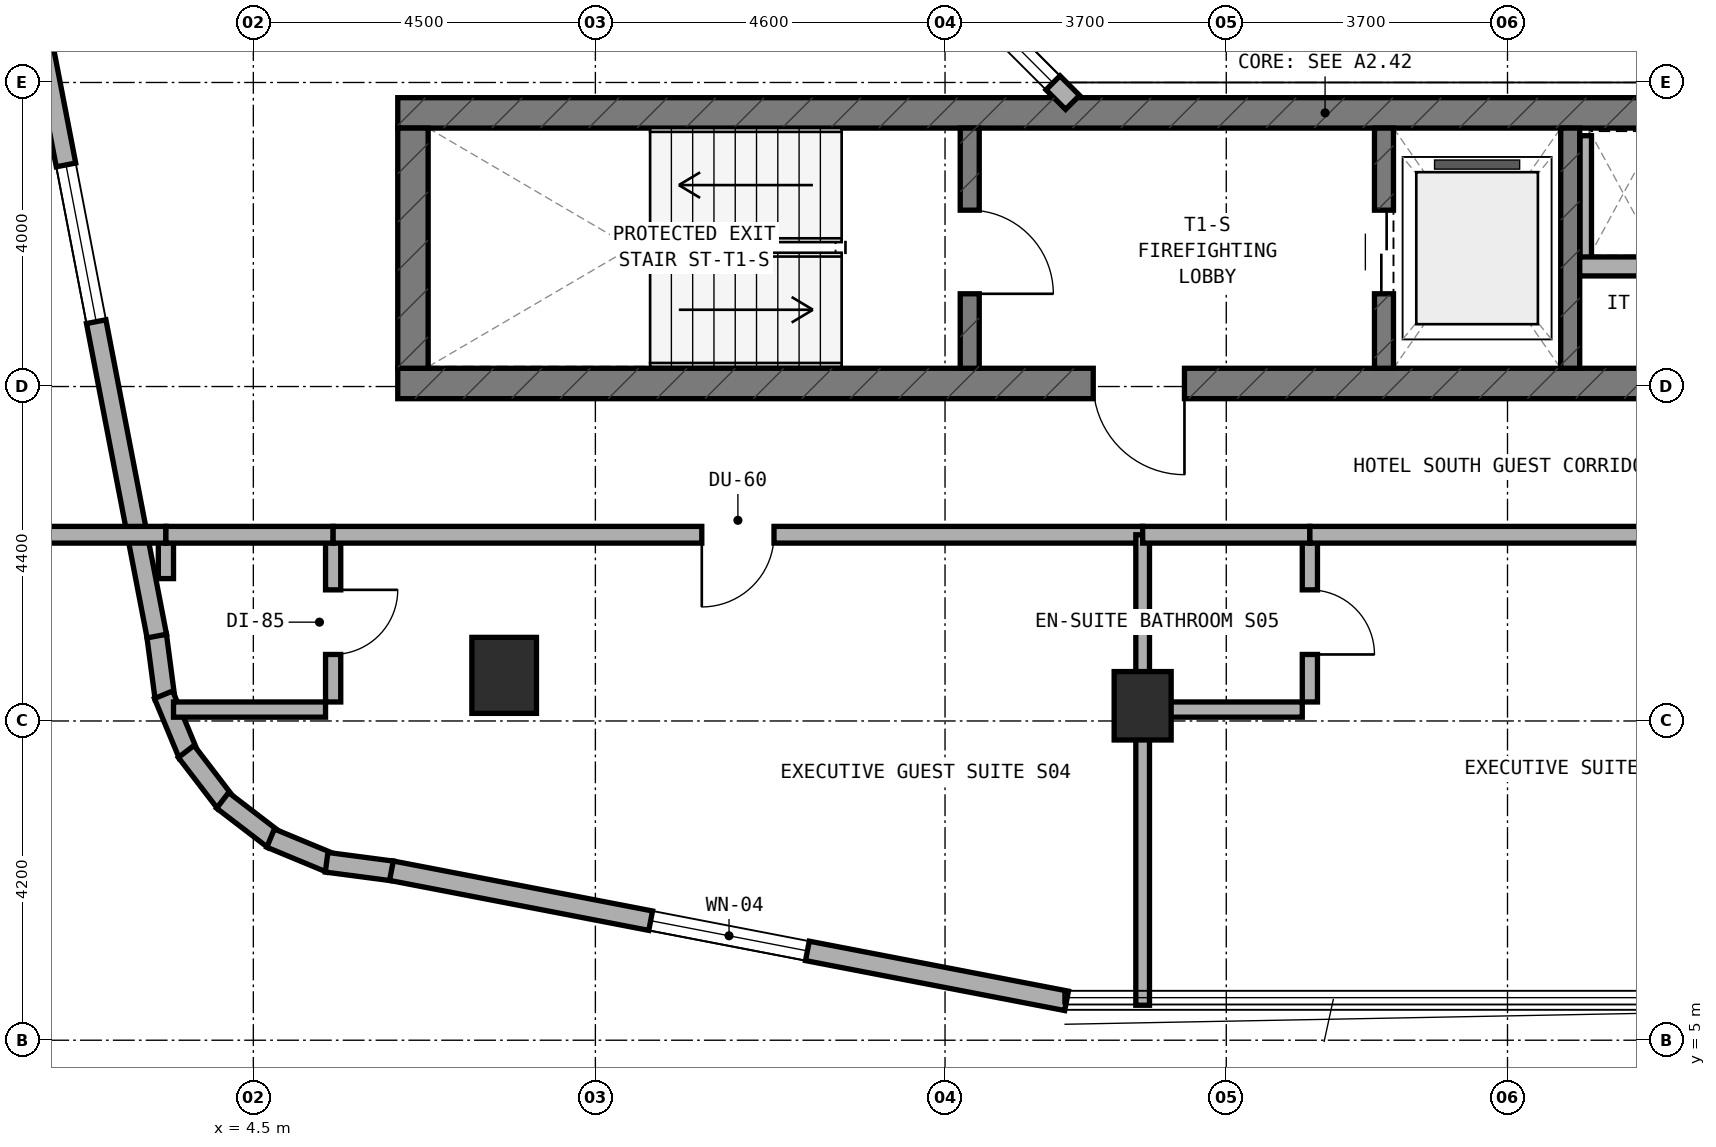
"""IFC4 building model, lengths in metres.
Left out: names, types, materials, properties, quantities, classifications, styles, units other than length and angle.
Written with IfcOpenShell. Run it as: python <this file> out.ifc"""

import sys

from ifc_helpers import new_model, si_unit, direction, frame, frame_2d, origin, origin_2d, place, context, subcontext, project, spatial, rectangle, extrude, element, fill, save


model = new_model("IFC4")
c1 = context("Model", 3, precision=1e-05, world=origin(), true_north=direction((0.0, 1.0)))
c2 = subcontext(c1, "Body", "Model", "MODEL_VIEW")
j1 = project(units=[si_unit("LENGTHUNIT", "METRE"), si_unit("PLANEANGLEUNIT", "RADIAN")], contexts=[c1])
p1 = place(None, origin())
s1 = spatial("IfcSite", under=j1, at=p1, CompositionType="ELEMENT")
p2 = place(p1, origin())
s2 = spatial("IfcBuilding", under=s1, at=p2, CompositionType="ELEMENT")
p3 = place(p2, frame((0.0, 0.0, 191.9)))
s3 = spatial("IfcBuildingStorey", under=s2, at=p3, CompositionType="ELEMENT", Elevation=191.9)
p4 = place(p3, frame((6.4, 13.64, 0.0), z_axis=(0.0, 0.0, 1.0), x_axis=(1.0, 0.0, 0.0)))
e1 = element("IfcWall", 1, at=p4, inside=s3, PredefinedType="SHEAR", context=c2, shape_type="SweptSolid", body=[
    extrude(rectangle(XDim=24.4, YDim=0.4, at=frame_2d((12.2, 0.0))), origin(), (0.0, 0.0, 1.0), 3.6),
])
p5 = place(p4, frame((9.15, 0.0, 0.0)))
e2 = element("IfcOpeningElement", 2, at=p5, cuts=e1, PredefinedType="OPENING", context=c2, shape_type="SweptSolid", body=[
    extrude(rectangle(XDim=1.2, YDim=2.15, at=frame_2d((0.6, 1.075))), frame((0.0, 0.21, 0.0), z_axis=(0.0, -1.0, 0.0), x_axis=(1.0, 0.0, 0.0)), (0.0, 0.0, 1.0), 0.42),
])
p6 = place(p4, frame((16.94, 0.0, 0.0)))
e3 = element("IfcOpeningElement", 3, at=p6, cuts=e1, PredefinedType="OPENING", context=c2, shape_type="SweptSolid", body=[
    extrude(rectangle(XDim=0.85, YDim=2.1, at=frame_2d((0.425, 1.05))), frame((0.0, 0.21, 0.0), z_axis=(0.0, -1.0, 0.0), x_axis=(1.0, 0.0, 0.0)), (0.0, 0.0, 1.0), 0.42),
])
p7 = place(p4, frame((18.783, 0.0, 0.0)))
e4 = element("IfcOpeningElement", 4, at=p7, cuts=e1, PredefinedType="OPENING", context=c2, shape_type="SweptSolid", body=[
    extrude(rectangle(XDim=1.1, YDim=2.15, at=frame_2d((0.55, 1.075))), frame((0.0, 0.21, 0.0), z_axis=(0.0, -1.0, 0.0), x_axis=(1.0, 0.0, 0.0)), (0.0, 0.0, 1.0), 0.42),
])
p8 = place(p4, frame((20.65, 0.0, 0.0)))
e5 = element("IfcOpeningElement", 5, at=p8, cuts=e1, PredefinedType="OPENING", context=c2, shape_type="SweptSolid", body=[
    extrude(rectangle(XDim=1.1, YDim=2.15, at=frame_2d((0.55, 1.075))), frame((0.0, 0.21, 0.0), z_axis=(0.0, -1.0, 0.0), x_axis=(1.0, 0.0, 0.0)), (0.0, 0.0, 1.0), 0.42),
])
p9 = place(p4, frame((22.517, 0.0, 0.0)))
e6 = element("IfcOpeningElement", 6, at=p9, cuts=e1, PredefinedType="OPENING", context=c2, shape_type="SweptSolid", body=[
    extrude(rectangle(XDim=1.1, YDim=2.15, at=frame_2d((0.55, 1.075))), frame((0.0, 0.21, 0.0), z_axis=(0.0, -1.0, 0.0), x_axis=(1.0, 0.0, 0.0)), (0.0, 0.0, 1.0), 0.42),
])
p10 = place(p3, frame((6.4, 17.2, 0.0), z_axis=(0.0, 0.0, 1.0), x_axis=(1.0, 0.0, 0.0)))
e7 = element("IfcWall", 7, at=p10, inside=s3, PredefinedType="SHEAR", context=c2, shape_type="SweptSolid", body=[
    extrude(rectangle(XDim=24.4, YDim=0.4, at=frame_2d((12.2, 0.0))), origin(), (0.0, 0.0, 1.0), 3.6),
])
p11 = place(p3, frame((6.6, 13.84, 0.0), z_axis=(0.0, 0.0, 1.0), x_axis=(0.0, 1.0, 0.0)))
e8 = element("IfcWall", 8, at=p11, inside=s3, PredefinedType="SHEAR", context=c2, shape_type="SweptSolid", body=[
    extrude(rectangle(XDim=3.16, YDim=0.4, at=frame_2d((1.58, 0.0))), origin(), (0.0, 0.0, 1.0), 3.6),
])
p12 = place(p3, frame((13.925, 13.84, 0.0), z_axis=(0.0, 0.0, 1.0), x_axis=(0.0, 1.0, 0.0)))
e9 = element("IfcWall", 9, at=p12, inside=s3, PredefinedType="STANDARD", context=c2, shape_type="SweptSolid", body=[
    extrude(rectangle(XDim=3.16, YDim=0.25, at=frame_2d((1.58, 0.0))), origin(), (0.0, 0.0, 1.0), 3.32),
])
p13 = place(p12, frame((0.98, 0.0, 0.0)))
e10 = element("IfcOpeningElement", 10, at=p13, cuts=e9, PredefinedType="OPENING", context=c2, shape_type="SweptSolid", body=[
    extrude(rectangle(XDim=1.1, YDim=2.15, at=frame_2d((0.55, 1.075))), frame((0.0, 0.135, 0.0), z_axis=(0.0, -1.0, 0.0), x_axis=(1.0, 0.0, 0.0)), (0.0, 0.0, 1.0), 0.27),
])
p14 = place(p3, frame((19.375, 13.84, 0.0), z_axis=(0.0, 0.0, 1.0), x_axis=(0.0, 1.0, 0.0)))
e11 = element("IfcWall", 11, at=p14, inside=s3, PredefinedType="STANDARD", context=c2, shape_type="SweptSolid", body=[
    extrude(rectangle(XDim=3.16, YDim=0.25, at=frame_2d((1.58, 0.0))), origin(), (0.0, 0.0, 1.0), 3.32),
])
p15 = place(p14, frame((0.98, 0.0, 0.0)))
e12 = element("IfcOpeningElement", 12, at=p15, cuts=e11, PredefinedType="OPENING", context=c2, shape_type="SweptSolid", body=[
    extrude(rectangle(XDim=1.1, YDim=2.15, at=frame_2d((0.55, 1.075))), frame((0.0, 0.135, 0.0), z_axis=(0.0, -1.0, 0.0), x_axis=(1.0, 0.0, 0.0)), (0.0, 0.0, 1.0), 0.27),
])
p16 = place(p3, frame((21.825, 13.84, 0.0), z_axis=(0.0, 0.0, 1.0), x_axis=(0.0, 1.0, 0.0)))
e13 = element("IfcWall", 13, at=p16, inside=s3, PredefinedType="STANDARD", context=c2, shape_type="SweptSolid", body=[
    extrude(rectangle(XDim=3.16, YDim=0.25, at=frame_2d((1.58, 0.0))), origin(), (0.0, 0.0, 1.0), 3.32),
])
p17 = place(p3, frame((16.2, 9.4, 0.0), z_axis=(0.0, 0.0, 1.0), x_axis=(1.0, 0.0, 0.0)))
e14 = element("IfcColumn", 14, at=p17, inside=s3, PredefinedType="COLUMN", context=c2, shape_type="SweptSolid", body=[
    extrude(rectangle(XDim=0.75, YDim=0.9, at=origin_2d()), origin(), (0.0, 0.0, 1.0), 3.6),
])
p18 = place(p3, frame((7.8, 9.8, 0.0), z_axis=(0.0, 0.0, 1.0), x_axis=(1.0, 0.0, 0.0)))
e15 = element("IfcColumn", 15, at=p18, inside=s3, PredefinedType="COLUMN", context=c2, shape_type="SweptSolid", body=[
    extrude(rectangle(XDim=0.85, YDim=1.0, at=origin_2d()), origin(), (0.0, 0.0, 1.0), 3.6),
])
p19 = place(p3, frame((3.228, 10.325, 0.0), z_axis=(0.0, 0.0, 1.0), x_axis=(0.130704676564, -0.99142134712, 0.0)))
e16 = element("IfcWall", 16, at=p19, inside=s3, PredefinedType="STANDARD", context=c2, shape_type="SweptSolid", body=[
    extrude(rectangle(XDim=0.833, YDim=0.26, at=frame_2d((0.417, 0.0))), origin(), (0.0, 0.0, 1.0), 3.32),
])
p20 = place(p3, frame((3.319, 9.545, 0.0), z_axis=(0.0, 0.0, 1.0), x_axis=(0.383086687796, -0.923712395518, 0.0)))
e17 = element("IfcWall", 17, at=p20, inside=s3, PredefinedType="STANDARD", context=c2, shape_type="SweptSolid", body=[
    extrude(rectangle(XDim=0.851, YDim=0.26, at=frame_2d((0.425, 0.0))), origin(), (0.0, 0.0, 1.0), 3.32),
])
for number, where, z_axis, x_axis in (
    (18, (3.617, 8.799, 0.0), (0.0, 0.0, 1.0), (0.608, -0.794, 0.0)),
    (19, (4.096, 8.155, 0.0), (0.0, 0.0, 1.0), (0.794, -0.608, 0.0)),
):
    element("IfcWall", number, at=place(p3, frame(where, z_axis=z_axis, x_axis=x_axis)), inside=s3, PredefinedType="STANDARD", context=c2, shape_type="SweptSolid", body=[
        extrude(rectangle(XDim=0.85, YDim=0.26, at=frame_2d((0.425, 0.0))), origin(), (0.0, 0.0, 1.0), 3.32),
    ])
p21 = place(p3, frame((4.727, 7.659, 0.0), z_axis=(0.0, 0.0, 1.0), x_axis=(0.923712395518, -0.383086687796, 0.0)))
e20 = element("IfcWall", 20, at=p21, inside=s3, PredefinedType="STANDARD", context=c2, shape_type="SweptSolid", body=[
    extrude(rectangle(XDim=0.851, YDim=0.26, at=frame_2d((0.425, 0.0))), origin(), (0.0, 0.0, 1.0), 3.32),
])
p22 = place(p3, frame((5.464, 7.341, 0.0), z_axis=(0.0, 0.0, 1.0), x_axis=(0.991488716273, -0.130192647656, 0.0)))
e21 = element("IfcWall", 21, at=p22, inside=s3, PredefinedType="STANDARD", context=c2, shape_type="SweptSolid", body=[
    extrude(rectangle(XDim=0.868, YDim=0.26, at=frame_2d((0.434, 0.0))), origin(), (0.0, 0.0, 1.0), 3.32),
])
p23 = place(p3, frame((6.317, 7.23, 0.0), z_axis=(0.0, 0.0, 1.0), x_axis=(0.98192801022, -0.189254809039, 0.0)))
e22 = element("IfcWall", 22, at=p23, inside=s3, PredefinedType="STANDARD", context=c2, shape_type="SweptSolid", body=[
    extrude(rectangle(XDim=9.046, YDim=0.26, at=frame_2d((4.523, 0.0))), origin(), (0.0, 0.0, 1.0), 3.32),
])
p24 = place(p23, frame((3.473, 0.0, 0.85)))
e23 = element("IfcOpeningElement", 23, at=p24, cuts=e22, PredefinedType="OPENING", context=c2, shape_type="SweptSolid", body=[
    extrude(rectangle(XDim=2.1, YDim=1.5, at=frame_2d((1.05, 0.75))), frame((0.0, 0.14, 0.0), z_axis=(0.0, -1.0, 0.0), x_axis=(1.0, 0.0, 0.0)), (0.0, 0.0, 1.0), 0.28),
])
p25 = place(p3, frame((15.278, 17.338, 0.0), z_axis=(0.0, 0.0, 1.0), x_axis=(-0.707106781187, 0.707106781187, 0.0)))
e24 = element("IfcWall", 24, at=p25, inside=s3, PredefinedType="STANDARD", context=c2, shape_type="SweptSolid", body=[
    extrude(rectangle(XDim=2.529, YDim=0.26, at=frame_2d((1.264, 0.0))), origin(), (0.0, 0.0, 1.0), 3.32),
])
p26 = place(p25, frame((0.364, 0.0, 0.85)))
e25 = element("IfcOpeningElement", 25, at=p26, cuts=e24, PredefinedType="OPENING", context=c2, shape_type="SweptSolid", body=[
    extrude(rectangle(XDim=1.8, YDim=1.5, at=frame_2d((0.9, 0.75))), frame((0.0, 0.14, 0.0), z_axis=(0.0, -1.0, 0.0), x_axis=(1.0, 0.0, 0.0)), (0.0, 0.0, 1.0), 0.28),
])
p27 = place(p3, frame((1.518, 19.199, 0.0), z_axis=(0.0, 0.0, 1.0), x_axis=(0.189254809039, -0.98192801022, 0.0)))
e26 = element("IfcWall", 26, at=p27, inside=s3, PredefinedType="STANDARD", context=c2, shape_type="SweptSolid", body=[
    extrude(rectangle(XDim=9.046, YDim=0.26, at=frame_2d((4.523, 0.0))), origin(), (0.0, 0.0, 1.0), 3.32),
])
p28 = place(p27, frame((2.733, 0.0, 0.85)))
e27 = element("IfcOpeningElement", 27, at=p28, cuts=e26, PredefinedType="OPENING", context=c2, shape_type="SweptSolid", body=[
    extrude(rectangle(XDim=2.1, YDim=1.5, at=frame_2d((1.05, 0.75))), frame((0.0, 0.14, 0.0), z_axis=(0.0, -1.0, 0.0), x_axis=(1.0, 0.0, 0.0)), (0.0, 0.0, 1.0), 0.28),
])
p29 = place(p3, frame((22.03, 15.28, 0.0), z_axis=(0.0, 0.0, 1.0), x_axis=(0.0, 1.0, 0.0)))
e28 = element("IfcWall", 28, at=p29, inside=s3, PredefinedType="PARTITIONING", context=c2, shape_type="SweptSolid", body=[
    extrude(rectangle(XDim=1.62, YDim=0.15, at=frame_2d((0.81, 0.0))), origin(), (0.0, 0.0, 1.0), 3.32),
])
p30 = place(p3, frame((21.95, 15.18, 0.0), z_axis=(0.0, 0.0, 1.0), x_axis=(1.0, 0.0, 0.0)))
e29 = element("IfcWall", 29, at=p30, inside=s3, PredefinedType="SOLIDWALL", context=c2, shape_type="SweptSolid", body=[
    extrude(rectangle(XDim=1.15, YDim=0.25, at=frame_2d((0.575, 0.0))), origin(), (0.0, 0.0, 1.0), 3.32),
])
p31 = place(p3, frame((5.55, 9.45, 0.0), z_axis=(0.0, 0.0, 1.0), x_axis=(0.0, 1.0, 0.0)))
e30 = element("IfcWall", 30, at=p31, inside=s3, PredefinedType="PLUMBINGWALL", context=c2, shape_type="SweptSolid", body=[
    extrude(rectangle(XDim=2.1, YDim=0.2, at=frame_2d((1.05, 0.0))), origin(), (0.0, 0.0, 1.0), 3.32),
])
p32 = place(p31, frame((0.625, 0.0, 0.0)))
e31 = element("IfcOpeningElement", 31, at=p32, cuts=e30, PredefinedType="OPENING", context=c2, shape_type="SweptSolid", body=[
    extrude(rectangle(XDim=0.85, YDim=2.1, at=frame_2d((0.425, 1.05))), frame((0.0, 0.11, 0.0), z_axis=(0.0, -1.0, 0.0), x_axis=(1.0, 0.0, 0.0)), (0.0, 0.0, 1.0), 0.22),
])
p33 = place(p3, frame((3.45, 9.35, 0.0), z_axis=(0.0, 0.0, 1.0), x_axis=(1.0, 0.0, 0.0)))
e32 = element("IfcWall", 32, at=p33, inside=s3, PredefinedType="PLUMBINGWALL", context=c2, shape_type="SweptSolid", body=[
    extrude(rectangle(XDim=2.0, YDim=0.2, at=frame_2d((1.0, 0.0))), origin(), (0.0, 0.0, 1.0), 3.32),
])
p34 = place(p3, frame((3.35, 11.073, 0.0), z_axis=(0.0, 0.0, 1.0), x_axis=(0.0, 1.0, 0.0)))
e33 = element("IfcWall", 33, at=p34, inside=s3, PredefinedType="PLUMBINGWALL", context=c2, shape_type="SweptSolid", body=[
    extrude(rectangle(XDim=0.577, YDim=0.2, at=frame_2d((0.289, 0.0))), origin(), (0.0, 0.0, 1.0), 3.32),
])
p35 = place(p3, frame((1.56, 11.65, 0.0), z_axis=(0.0, 0.0, 1.0), x_axis=(1.0, 0.0, 0.0)))
e34 = element("IfcWall", 34, at=p35, inside=s3, PredefinedType="SOLIDWALL", context=c2, shape_type="SweptSolid", body=[
    extrude(rectangle(XDim=1.79, YDim=0.22, at=frame_2d((0.895, 0.0))), origin(), (0.0, 0.0, 1.0), 3.32),
])
p36 = place(p3, frame((3.35, 11.65, 0.0), z_axis=(0.0, 0.0, 1.0), x_axis=(1.0, 0.0, 0.0)))
e35 = element("IfcWall", 35, at=p36, inside=s3, PredefinedType="SOLIDWALL", context=c2, shape_type="SweptSolid", body=[
    extrude(rectangle(XDim=2.2, YDim=0.22, at=frame_2d((1.1, 0.0))), origin(), (0.0, 0.0, 1.0), 3.32),
])
p37 = place(p3, frame((5.55, 11.65, 0.0), z_axis=(0.0, 0.0, 1.0), x_axis=(1.0, 0.0, 0.0)))
e36 = element("IfcWall", 36, at=p37, inside=s3, PredefinedType="SOLIDWALL", context=c2, shape_type="SweptSolid", body=[
    extrude(rectangle(XDim=10.65, YDim=0.22, at=frame_2d((5.325, 0.0))), origin(), (0.0, 0.0, 1.0), 2.995),
])
p38 = place(p37, frame((4.85, 0.0, 0.0)))
e37 = element("IfcOpeningElement", 37, at=p38, cuts=e36, PredefinedType="OPENING", context=c2, shape_type="SweptSolid", body=[
    extrude(rectangle(XDim=0.95, YDim=2.1, at=frame_2d((0.475, 1.05))), frame((0.0, 0.12, 0.0), z_axis=(0.0, -1.0, 0.0), x_axis=(1.0, 0.0, 0.0)), (0.0, 0.0, 1.0), 0.24),
])
p39 = place(p3, frame((16.2, 5.46, 0.0), z_axis=(0.0, 0.0, 1.0), x_axis=(0.0, 1.0, 0.0)))
e38 = element("IfcWall", 38, at=p39, inside=s3, PredefinedType="SOLIDWALL", context=c2, shape_type="SweptSolid", body=[
    extrude(rectangle(XDim=6.19, YDim=0.18, at=frame_2d((3.095, 0.0))), origin(), (0.0, 0.0, 1.0), 2.935),
])
p40 = place(p3, frame((18.4, 9.45, 0.0), z_axis=(0.0, 0.0, 1.0), x_axis=(0.0, 1.0, 0.0)))
e39 = element("IfcWall", 39, at=p40, inside=s3, PredefinedType="PLUMBINGWALL", context=c2, shape_type="SweptSolid", body=[
    extrude(rectangle(XDim=2.1, YDim=0.2, at=frame_2d((1.05, 0.0))), origin(), (0.0, 0.0, 1.0), 2.935),
])
p41 = place(p40, frame((0.625, 0.0, 0.0)))
e40 = element("IfcOpeningElement", 40, at=p41, cuts=e39, PredefinedType="OPENING", context=c2, shape_type="SweptSolid", body=[
    extrude(rectangle(XDim=0.85, YDim=2.1, at=frame_2d((0.425, 1.05))), frame((0.0, 0.11, 0.0), z_axis=(0.0, -1.0, 0.0), x_axis=(1.0, 0.0, 0.0)), (0.0, 0.0, 1.0), 0.22),
])
p42 = place(p3, frame((16.3, 9.35, 0.0), z_axis=(0.0, 0.0, 1.0), x_axis=(1.0, 0.0, 0.0)))
e41 = element("IfcWall", 41, at=p42, inside=s3, PredefinedType="PLUMBINGWALL", context=c2, shape_type="SweptSolid", body=[
    extrude(rectangle(XDim=2.0, YDim=0.2, at=frame_2d((1.0, 0.0))), origin(), (0.0, 0.0, 1.0), 2.935),
])
p43 = place(p3, frame((16.2, 11.65, 0.0), z_axis=(0.0, 0.0, 1.0), x_axis=(1.0, 0.0, 0.0)))
e42 = element("IfcWall", 42, at=p43, inside=s3, PredefinedType="SOLIDWALL", context=c2, shape_type="SweptSolid", body=[
    extrude(rectangle(XDim=2.2, YDim=0.22, at=frame_2d((1.1, 0.0))), origin(), (0.0, 0.0, 1.0), 2.995),
])
p44 = place(p3, frame((18.4, 11.65, 0.0), z_axis=(0.0, 0.0, 1.0), x_axis=(1.0, 0.0, 0.0)))
e43 = element("IfcWall", 43, at=p44, inside=s3, PredefinedType="SOLIDWALL", context=c2, shape_type="SweptSolid", body=[
    extrude(rectangle(XDim=15.8, YDim=0.22, at=frame_2d((7.9, 0.0))), origin(), (0.0, 0.0, 1.0), 2.995),
])
p45 = place(p44, frame((7.425, 0.0, 0.0)))
e44 = element("IfcOpeningElement", 44, at=p45, cuts=e43, PredefinedType="OPENING", context=c2, shape_type="SweptSolid", body=[
    extrude(rectangle(XDim=0.95, YDim=2.1, at=frame_2d((0.475, 1.05))), frame((0.0, 0.12, 0.0), z_axis=(0.0, -1.0, 0.0), x_axis=(1.0, 0.0, 0.0)), (0.0, 0.0, 1.0), 0.24),
])
p46 = place(p24, origin())
e45 = element("IfcWindow", 45, at=p46, inside=s3, PartitioningType="SINGLE_PANEL", PredefinedType="WINDOW", context=c2, shape_type="SweptSolid", body=[
    extrude(rectangle(XDim=2.1, YDim=1.5, at=frame_2d((1.05, 0.75))), frame((0.0, 0.03, 0.0), z_axis=(0.0, -1.0, 0.0), x_axis=(1.0, 0.0, 0.0)), (0.0, 0.0, 1.0), 0.06),
])
fill(e23, e45)
p47 = place(p26, origin())
e46 = element("IfcWindow", 46, at=p47, inside=s3, PartitioningType="SINGLE_PANEL", PredefinedType="WINDOW", context=c2, shape_type="SweptSolid", body=[
    extrude(rectangle(XDim=1.8, YDim=1.5, at=frame_2d((0.9, 0.75))), frame((0.0, 0.03, 0.0), z_axis=(0.0, -1.0, 0.0), x_axis=(1.0, 0.0, 0.0)), (0.0, 0.0, 1.0), 0.06),
])
fill(e25, e46)
p48 = place(p28, origin())
e47 = element("IfcWindow", 47, at=p48, inside=s3, PartitioningType="SINGLE_PANEL", PredefinedType="WINDOW", context=c2, shape_type="SweptSolid", body=[
    extrude(rectangle(XDim=2.1, YDim=1.5, at=frame_2d((1.05, 0.75))), frame((0.0, 0.03, 0.0), z_axis=(0.0, -1.0, 0.0), x_axis=(1.0, 0.0, 0.0)), (0.0, 0.0, 1.0), 0.06),
])
fill(e27, e47)
p49 = place(p13, frame((1.1, 0.0, 0.0), z_axis=(0.0, 0.0, 1.0), x_axis=(-1.0, 0.0, 0.0)))
e48 = element("IfcDoor", 48, at=p49, inside=s3, OperationType="SINGLE_SWING_RIGHT", PredefinedType="DOOR", context=c2, shape_type="SweptSolid", body=[
    extrude(rectangle(XDim=1.1, YDim=2.15, at=frame_2d((0.55, 1.075))), frame((0.0, 0.025, 0.0), z_axis=(0.0, -1.0, 0.0), x_axis=(1.0, 0.0, 0.0)), (0.0, 0.0, 1.0), 0.05),
])
fill(e10, e48)
p50 = place(p5, frame((1.2, 0.0, 0.0), z_axis=(0.0, 0.0, 1.0), x_axis=(-1.0, 0.0, 0.0)))
e49 = element("IfcDoor", 49, at=p50, inside=s3, OperationType="SINGLE_SWING_LEFT", PredefinedType="DOOR", context=c2, shape_type="SweptSolid", body=[
    extrude(rectangle(XDim=1.2, YDim=2.15, at=frame_2d((0.6, 1.075))), frame((0.0, 0.025, 0.0), z_axis=(0.0, -1.0, 0.0), x_axis=(1.0, 0.0, 0.0)), (0.0, 0.0, 1.0), 0.05),
])
fill(e2, e49)
p51 = place(p15, origin())
e50 = element("IfcDoor", 50, at=p51, inside=s3, OperationType="DOUBLE_DOOR_SLIDING", PredefinedType="DOOR", context=c2, shape_type="SweptSolid", body=[
    extrude(rectangle(XDim=1.1, YDim=2.15, at=frame_2d((0.55, 1.075))), frame((0.0, 0.025, 0.0), z_axis=(0.0, -1.0, 0.0), x_axis=(1.0, 0.0, 0.0)), (0.0, 0.0, 1.0), 0.05),
])
fill(e12, e50)
p52 = place(p32, frame((0.85, 0.0, 0.0), z_axis=(0.0, 0.0, 1.0), x_axis=(-1.0, 0.0, 0.0)))
e51 = element("IfcDoor", 51, at=p52, inside=s3, OperationType="SINGLE_SWING_LEFT", PredefinedType="DOOR", context=c2, shape_type="SweptSolid", body=[
    extrude(rectangle(XDim=0.85, YDim=2.1, at=frame_2d((0.425, 1.05))), frame((0.0, 0.025, 0.0), z_axis=(0.0, -1.0, 0.0), x_axis=(1.0, 0.0, 0.0)), (0.0, 0.0, 1.0), 0.05),
])
fill(e31, e51)
p53 = place(p38, frame((0.95, 0.0, 0.0), z_axis=(0.0, 0.0, 1.0), x_axis=(-1.0, 0.0, 0.0)))
e52 = element("IfcDoor", 52, at=p53, inside=s3, OperationType="SINGLE_SWING_RIGHT", PredefinedType="DOOR", context=c2, shape_type="SweptSolid", body=[
    extrude(rectangle(XDim=0.95, YDim=2.1, at=frame_2d((0.475, 1.05))), frame((0.0, 0.025, 0.0), z_axis=(0.0, -1.0, 0.0), x_axis=(1.0, 0.0, 0.0)), (0.0, 0.0, 1.0), 0.05),
])
fill(e37, e52)
p54 = place(p41, frame((0.85, 0.0, 0.0), z_axis=(0.0, 0.0, 1.0), x_axis=(-1.0, 0.0, 0.0)))
e53 = element("IfcDoor", 53, at=p54, inside=s3, OperationType="SINGLE_SWING_RIGHT", PredefinedType="DOOR", context=c2, shape_type="SweptSolid", body=[
    extrude(rectangle(XDim=0.85, YDim=2.1, at=frame_2d((0.425, 1.05))), frame((0.0, 0.025, 0.0), z_axis=(0.0, -1.0, 0.0), x_axis=(1.0, 0.0, 0.0)), (0.0, 0.0, 1.0), 0.05),
])
fill(e40, e53)
save(model, sys.argv[1])
